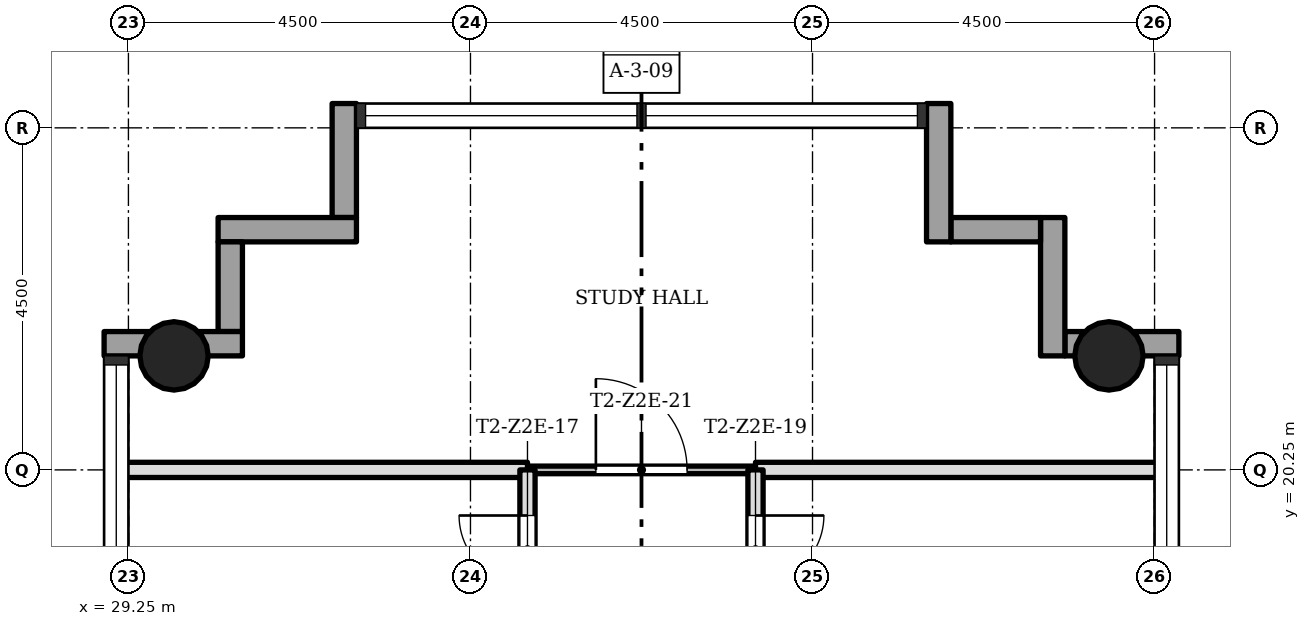
"""IFC4 building model, lengths in metres.
Left out: names, types, materials, properties, quantities, classifications, styles, units other than length and angle.
Written with IfcOpenShell. Run it as: python <this file> out.ifc"""

import sys

from ifc_helpers import new_model, si_unit, direction, frame, frame_2d, origin, origin_2d, place, context, subcontext, project, spatial, rectangle, hollow_circle, extrude, element, fill, save


model = new_model("IFC4")
c1 = context("Model", 3, precision=1e-05, world=origin(), true_north=direction((0.0, 1.0)))
c2 = subcontext(c1, "Body", "Model", "MODEL_VIEW")
j1 = project(units=[si_unit("LENGTHUNIT", "METRE"), si_unit("PLANEANGLEUNIT", "RADIAN")], contexts=[c1])
p1 = place(None, origin())
s1 = spatial("IfcSite", under=j1, at=p1, CompositionType="ELEMENT")
p2 = place(p1, origin())
s2 = spatial("IfcBuilding", under=s1, at=p2, CompositionType="ELEMENT")
p3 = place(p2, frame((0.0, 0.0, 103.8)))
s3 = spatial("IfcBuildingStorey", under=s2, at=p3, CompositionType="ELEMENT", Elevation=103.8)
for number, where, z_axis, x_axis in (
    (1, (42.15, 21.75, 0.0), (0.0, 0.0, 1.0), (1.0, 0.0, 0.0)),
    (2, (29.85, 21.75, 0.0), (0.0, 0.0, 1.0), (1.0, 0.0, 0.0)),
):
    element("IfcColumn", number, at=place(p3, frame(where, z_axis=z_axis, x_axis=x_axis)), inside=s3, PredefinedType="COLUMN", context=c2, shape_type="SweptSolid", body=[
        extrude(hollow_circle(Radius=0.45, WallThickness=0.032, at=origin_2d()), origin(), (0.0, 0.0, 1.0), 3.4),
    ])
p4 = place(p3, frame((43.07, 21.91, -0.3), z_axis=(0.0, 0.0, 1.0), x_axis=(-1.0, 0.0, 0.0)))
e3 = element("IfcWall", 3, at=p4, inside=s3, PredefinedType="STANDARD", context=c2, shape_type="SweptSolid", body=[
    extrude(rectangle(XDim=1.5, YDim=0.32, at=frame_2d((0.75, 0.0))), origin(), (0.0, 0.0, 1.0), 3.4),
])
p5 = place(p3, frame((41.41, 21.75, -0.3), z_axis=(0.0, 0.0, 1.0), x_axis=(0.0, 1.0, 0.0)))
e4 = element("IfcWall", 4, at=p5, inside=s3, PredefinedType="STANDARD", context=c2, shape_type="SweptSolid", body=[
    extrude(rectangle(XDim=1.82, YDim=0.32, at=frame_2d((0.91, 0.0))), origin(), (0.0, 0.0, 1.0), 3.4),
])
p6 = place(p3, frame((41.25, 23.41, -0.3), z_axis=(0.0, 0.0, 1.0), x_axis=(-1.0, 0.0, 0.0)))
e5 = element("IfcWall", 5, at=p6, inside=s3, PredefinedType="STANDARD", context=c2, shape_type="SweptSolid", body=[
    extrude(rectangle(XDim=1.18, YDim=0.32, at=frame_2d((0.59, 0.0))), origin(), (0.0, 0.0, 1.0), 3.4),
])
p7 = place(p3, frame((39.91, 23.25, -0.3), z_axis=(0.0, 0.0, 1.0), x_axis=(0.0, 1.0, 0.0)))
e6 = element("IfcWall", 6, at=p7, inside=s3, PredefinedType="STANDARD", context=c2, shape_type="SweptSolid", body=[
    extrude(rectangle(XDim=1.82, YDim=0.32, at=frame_2d((0.91, 0.0))), origin(), (0.0, 0.0, 1.0), 3.4),
])
p8 = place(p3, frame((32.09, 25.07, -0.3), z_axis=(0.0, 0.0, 1.0), x_axis=(0.0, -1.0, 0.0)))
e7 = element("IfcWall", 7, at=p8, inside=s3, PredefinedType="STANDARD", context=c2, shape_type="SweptSolid", body=[
    extrude(rectangle(XDim=1.5, YDim=0.32, at=frame_2d((0.75, 0.0))), origin(), (0.0, 0.0, 1.0), 3.4),
])
p9 = place(p3, frame((32.25, 23.41, -0.3), z_axis=(0.0, 0.0, 1.0), x_axis=(-1.0, 0.0, 0.0)))
e8 = element("IfcWall", 8, at=p9, inside=s3, PredefinedType="STANDARD", context=c2, shape_type="SweptSolid", body=[
    extrude(rectangle(XDim=1.82, YDim=0.32, at=frame_2d((0.91, 0.0))), origin(), (0.0, 0.0, 1.0), 3.4),
])
p10 = place(p3, frame((30.59, 23.25, -0.3), z_axis=(0.0, 0.0, 1.0), x_axis=(0.0, -1.0, 0.0)))
e9 = element("IfcWall", 9, at=p10, inside=s3, PredefinedType="STANDARD", context=c2, shape_type="SweptSolid", body=[
    extrude(rectangle(XDim=1.18, YDim=0.32, at=frame_2d((0.59, 0.0))), origin(), (0.0, 0.0, 1.0), 3.4),
])
p11 = place(p3, frame((30.75, 21.91, -0.3), z_axis=(0.0, 0.0, 1.0), x_axis=(-1.0, 0.0, 0.0)))
e10 = element("IfcWall", 10, at=p11, inside=s3, PredefinedType="STANDARD", context=c2, shape_type="SweptSolid", body=[
    extrude(rectangle(XDim=1.82, YDim=0.32, at=frame_2d((0.91, 0.0))), origin(), (0.0, 0.0, 1.0), 3.4),
])
p12 = place(p3, frame((37.5, 20.25, 0.0), z_axis=(0.0, 0.0, 1.0), x_axis=(-1.0, 0.0, 0.0)))
e11 = element("IfcWall", 11, at=p12, inside=s3, PredefinedType="PARTITIONING", context=c2, shape_type="SweptSolid", body=[
    extrude(rectangle(XDim=3.0, YDim=0.1, at=frame_2d((1.5, 0.0))), origin(), (0.0, 0.0, 1.0), 3.0),
])
p13 = place(p12, frame((0.9, 0.0, 0.0)))
e12 = element("IfcOpeningElement", 12, at=p13, cuts=e11, PredefinedType="OPENING", context=c2, shape_type="SweptSolid", body=[
    extrude(rectangle(XDim=1.2, YDim=2.1, at=frame_2d((0.6, 1.05))), frame((0.0, 0.06, 0.0), z_axis=(0.0, -1.0, 0.0), x_axis=(1.0, 0.0, 0.0)), (0.0, 0.0, 1.0), 0.12),
])
for number, where, z_axis, x_axis in (
    (13, (42.85, 20.25, 0.0), (0.0, 0.0, 1.0), (-1.0, 0.0, 0.0)),
    (14, (34.5, 20.25, 0.0), (0.0, 0.0, 1.0), (-1.0, 0.0, 0.0)),
):
    element("IfcWall", number, at=place(p3, frame(where, z_axis=z_axis, x_axis=x_axis)), inside=s3, PredefinedType="SOLIDWALL", context=c2, shape_type="SweptSolid", body=[
        extrude(rectangle(XDim=5.35, YDim=0.2, at=frame_2d((2.675, 0.0))), origin(), (0.0, 0.0, 1.0), 3.0),
    ])
p14 = place(p3, frame((37.5, 15.75, 0.0), z_axis=(0.0, 0.0, 1.0), x_axis=(0.0, 1.0, 0.0)))
e15 = element("IfcWall", 15, at=p14, inside=s3, PredefinedType="SOLIDWALL", context=c2, shape_type="SweptSolid", body=[
    extrude(rectangle(XDim=4.5, YDim=0.2, at=frame_2d((2.25, 0.0))), origin(), (0.0, 0.0, 1.0), 3.0),
])
p15 = place(p14, frame((3.0, 0.0, 0.0)))
e16 = element("IfcOpeningElement", 16, at=p15, cuts=e15, PredefinedType="OPENING", context=c2, shape_type="SweptSolid", body=[
    extrude(rectangle(XDim=0.9, YDim=2.1, at=frame_2d((0.45, 1.05))), frame((0.0, 0.11, 0.0), z_axis=(0.0, -1.0, 0.0), x_axis=(1.0, 0.0, 0.0)), (0.0, 0.0, 1.0), 0.22),
])
p16 = place(p3, frame((34.5, 15.75, 0.0), z_axis=(0.0, 0.0, 1.0), x_axis=(0.0, 1.0, 0.0)))
e17 = element("IfcWall", 17, at=p16, inside=s3, PredefinedType="SOLIDWALL", context=c2, shape_type="SweptSolid", body=[
    extrude(rectangle(XDim=4.5, YDim=0.2, at=frame_2d((2.25, 0.0))), origin(), (0.0, 0.0, 1.0), 3.0),
])
p17 = place(p16, frame((3.0, 0.0, 0.0)))
e18 = element("IfcOpeningElement", 18, at=p17, cuts=e17, PredefinedType="OPENING", context=c2, shape_type="SweptSolid", body=[
    extrude(rectangle(XDim=0.9, YDim=2.1, at=frame_2d((0.45, 1.05))), frame((0.0, 0.11, 0.0), z_axis=(0.0, -1.0, 0.0), x_axis=(1.0, 0.0, 0.0)), (0.0, 0.0, 1.0), 0.22),
])
p18 = place(p17, origin())
e19 = element("IfcDoor", 19, at=p18, inside=s3, OperationType="SINGLE_SWING_LEFT", PredefinedType="DOOR", context=c2, shape_type="SweptSolid", body=[
    extrude(rectangle(XDim=0.9, YDim=2.1, at=frame_2d((0.45, 1.05))), frame((0.0, 0.025, 0.0), z_axis=(0.0, -1.0, 0.0), x_axis=(1.0, 0.0, 0.0)), (0.0, 0.0, 1.0), 0.05),
])
fill(e18, e19)
p19 = place(p15, origin())
e20 = element("IfcDoor", 20, at=p19, inside=s3, OperationType="SINGLE_SWING_RIGHT", PredefinedType="DOOR", context=c2, shape_type="SweptSolid", body=[
    extrude(rectangle(XDim=0.9, YDim=2.1, at=frame_2d((0.45, 1.05))), frame((0.0, 0.025, 0.0), z_axis=(0.0, -1.0, 0.0), x_axis=(1.0, 0.0, 0.0)), (0.0, 0.0, 1.0), 0.05),
])
fill(e16, e20)
p20 = place(p13, origin())
e21 = element("IfcDoor", 21, at=p20, inside=s3, OperationType="SINGLE_SWING_RIGHT", PredefinedType="DOOR", context=c2, shape_type="SweptSolid", body=[
    extrude(rectangle(XDim=1.2, YDim=2.1, at=frame_2d((0.6, 1.05))), frame((0.0, 0.025, 0.0), z_axis=(0.0, -1.0, 0.0), x_axis=(1.0, 0.0, 0.0)), (0.0, 0.0, 1.0), 0.05),
])
fill(e12, e21)
save(model, sys.argv[1])
